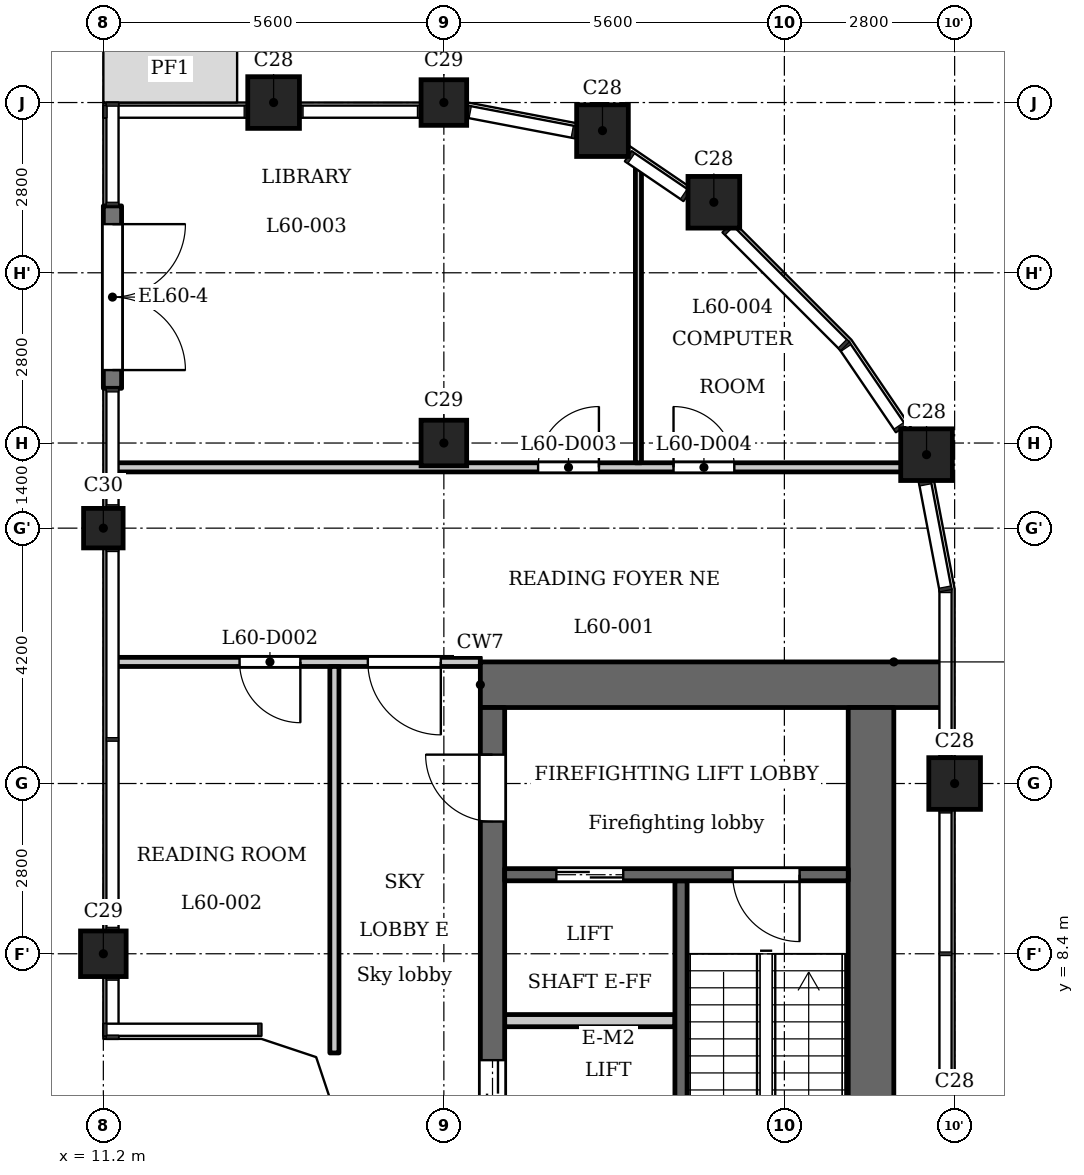
"""IFC4 building model, lengths in metres.
Left out: names, types, materials, properties, quantities, classifications, styles, units other than length and angle.
Written with IfcOpenShell. Run it as: python <this file> out.ifc"""

import sys

from ifc_helpers import new_model, si_unit, direction, frame, frame_2d, origin, origin_2d, place, context, subcontext, project, spatial, polyline, rectangle, outline, extrude, element, fill, save


model = new_model("IFC4")
c1 = context("Model", 3, precision=1e-05, world=origin(), true_north=direction((0.0, 1.0)))
c2 = subcontext(c1, "Body", "Model", "MODEL_VIEW")
j1 = project(units=[si_unit("LENGTHUNIT", "METRE"), si_unit("PLANEANGLEUNIT", "RADIAN")], contexts=[c1])
p1 = place(None, origin())
s1 = spatial("IfcSite", under=j1, at=p1, CompositionType="ELEMENT")
p2 = place(p1, origin())
s2 = spatial("IfcBuilding", under=s1, at=p2, CompositionType="ELEMENT")
p3 = place(p2, frame((0.0, 0.0, 230.9)))
s3 = spatial("IfcBuildingStorey", under=s2, at=p3, CompositionType="ELEMENT", Elevation=230.9)
for number, where, z_axis, x_axis in (
    (1, (25.2, 11.2, 0.0), (0.0, 0.0, 1.0), (1.0, 0.0, 0.0)),
    (2, (24.738, 16.609, 0.0), (0.0, 0.0, 1.0), (1.0, 0.0, 0.0)),
    (3, (21.24, 20.76, 0.0), (0.0, 0.0, 1.0), (1.0, 0.0, 0.0)),
    (4, (19.409, 21.938, 0.0), (0.0, 0.0, 1.0), (1.0, 0.0, 0.0)),
    (5, (14.0, 22.4, 0.0), (0.0, 0.0, 1.0), (1.0, 0.0, 0.0)),
):
    element("IfcColumn", number, at=place(p3, frame(where, z_axis=z_axis, x_axis=x_axis)), inside=s3, PredefinedType="COLUMN", context=c2, shape_type="SweptSolid", body=[
        extrude(rectangle(XDim=0.85, YDim=0.85, at=origin_2d()), origin(), (0.0, 0.0, 1.0), 5.4),
    ])
for number, where, z_axis, x_axis in (
    (6, (16.8, 16.8, 0.0), (0.0, 0.0, 1.0), (1.0, 0.0, 0.0)),
    (7, (16.8, 22.4, 0.0), (0.0, 0.0, 1.0), (1.0, 0.0, 0.0)),
    (8, (11.2, 8.4, 0.0), (0.0, 0.0, 1.0), (1.0, 0.0, 0.0)),
):
    element("IfcColumn", number, at=place(p3, frame(where, z_axis=z_axis, x_axis=x_axis)), inside=s3, PredefinedType="COLUMN", context=c2, shape_type="SweptSolid", body=[
        extrude(rectangle(XDim=0.75, YDim=0.75, at=origin_2d()), origin(), (0.0, 0.0, 1.0), 5.4),
    ])
p4 = place(p3, frame((11.2, 15.4, 0.0), z_axis=(0.0, 0.0, 1.0), x_axis=(1.0, 0.0, 0.0)))
e9 = element("IfcColumn", 9, at=p4, inside=s3, PredefinedType="COLUMN", context=c2, shape_type="SweptSolid", body=[
    extrude(rectangle(XDim=0.65, YDim=0.65, at=origin_2d()), origin(), (0.0, 0.0, 1.0), 5.4),
])
p5 = place(p3, frame((11.35, 20.7, 0.0), z_axis=(0.0, 0.0, 1.0), x_axis=(0.0, -1.0, 0.0)))
e10 = element("IfcWall", 10, at=p5, inside=s3, PredefinedType="SOLIDWALL", context=c2, shape_type="SweptSolid", body=[
    extrude(rectangle(XDim=3.0, YDim=0.3, at=frame_2d((1.5, 0.0))), origin(), (0.0, 0.0, 1.0), 4.95),
])
p6 = place(p5, frame((0.3, 0.0, 0.0)))
e11 = element("IfcOpeningElement", 11, at=p6, cuts=e10, PredefinedType="OPENING", context=c2, shape_type="SweptSolid", body=[
    extrude(rectangle(XDim=2.4, YDim=2.3, at=frame_2d((1.2, 1.15))), frame((0.0, 0.16, 0.0), z_axis=(0.0, -1.0, 0.0), x_axis=(1.0, 0.0, 0.0)), (0.0, 0.0, 1.0), 0.32),
])
p7 = place(p3, frame((20.7, 2.6, 0.0), z_axis=(0.0, 0.0, 1.0), x_axis=(0.0, 1.0, 0.0)))
e12 = element("IfcWall", 12, at=p7, inside=s3, PredefinedType="SHEAR", context=c2, shape_type="SweptSolid", body=[
    extrude(rectangle(XDim=7.0, YDim=0.2, at=frame_2d((3.5, 0.0))), origin(), (0.0, 0.0, 1.0), 4.95),
])
p8 = place(p3, frame((17.4, 12.825, 0.0), z_axis=(0.0, 0.0, 1.0), x_axis=(1.0, 0.0, 0.0)))
e13 = element("IfcWall", 13, at=p8, inside=s3, PredefinedType="SHEAR", context=c2, shape_type="SweptSolid", body=[
    extrude(rectangle(XDim=7.6, YDim=0.75, at=frame_2d((3.8, 0.0))), origin(), (0.0, 0.0, 1.0), 4.95),
])
p9 = place(p3, frame((17.6, -12.45, 0.0), z_axis=(0.0, 0.0, 1.0), x_axis=(0.0, 1.0, 0.0)))
e14 = element("IfcWall", 14, at=p9, inside=s3, PredefinedType="SHEAR", context=c2, shape_type="SweptSolid", body=[
    extrude(rectangle(XDim=24.9, YDim=0.4, at=frame_2d((12.45, 0.0))), origin(), (0.0, 0.0, 1.0), 4.95),
])
p10 = place(p9, frame((8.65, 0.0, 0.0)))
e15 = element("IfcOpeningElement", 15, at=p10, cuts=e14, PredefinedType="OPENING", context=c2, shape_type="SweptSolid", body=[
    extrude(rectangle(XDim=0.9, YDim=2.1, at=frame_2d((0.45, 1.05))), frame((0.0, 0.21, 0.0), z_axis=(0.0, -1.0, 0.0), x_axis=(1.0, 0.0, 0.0)), (0.0, 0.0, 1.0), 0.42),
])
p11 = place(p9, frame((15.6, 0.0, 0.0)))
e16 = element("IfcOpeningElement", 16, at=p11, cuts=e14, PredefinedType="OPENING", context=c2, shape_type="SweptSolid", body=[
    extrude(rectangle(XDim=1.1, YDim=2.1, at=frame_2d((0.55, 1.05))), frame((0.0, 0.21, 0.0), z_axis=(0.0, -1.0, 0.0), x_axis=(1.0, 0.0, 0.0)), (0.0, 0.0, 1.0), 0.42),
])
p12 = place(p9, frame((18.0, 0.0, 0.0)))
e17 = element("IfcOpeningElement", 17, at=p12, cuts=e14, PredefinedType="OPENING", context=c2, shape_type="SweptSolid", body=[
    extrude(rectangle(XDim=1.1, YDim=2.1, at=frame_2d((0.55, 1.05))), frame((0.0, 0.21, 0.0), z_axis=(0.0, -1.0, 0.0), x_axis=(1.0, 0.0, 0.0)), (0.0, 0.0, 1.0), 0.42),
])
p13 = place(p9, frame((23.025, 0.0, 0.0)))
e18 = element("IfcOpeningElement", 18, at=p13, cuts=e14, PredefinedType="OPENING", context=c2, shape_type="SweptSolid", body=[
    extrude(rectangle(XDim=1.1, YDim=2.1, at=frame_2d((0.55, 1.05))), frame((0.0, 0.21, 0.0), z_axis=(0.0, -1.0, 0.0), x_axis=(1.0, 0.0, 0.0)), (0.0, 0.0, 1.0), 0.42),
])
p14 = place(p9, frame((0.775, 0.0, 0.0)))
e19 = element("IfcOpeningElement", 19, at=p14, cuts=e14, PredefinedType="OPENING", context=c2, shape_type="SweptSolid", body=[
    extrude(rectangle(XDim=1.1, YDim=2.1, at=frame_2d((0.55, 1.05))), frame((0.0, 0.21, 0.0), z_axis=(0.0, -1.0, 0.0), x_axis=(1.0, 0.0, 0.0)), (0.0, 0.0, 1.0), 0.42),
])
p15 = place(p9, frame((12.925, 0.0, 0.0)))
e20 = element("IfcOpeningElement", 20, at=p15, cuts=e14, PredefinedType="OPENING", context=c2, shape_type="SweptSolid", body=[
    extrude(rectangle(XDim=1.8, YDim=2.1, at=frame_2d((0.9, 1.05))), frame((0.0, 0.21, 0.0), z_axis=(0.0, -1.0, 0.0), x_axis=(1.0, 0.0, 0.0)), (0.0, 0.0, 1.0), 0.42),
])
p16 = place(p3, frame((23.825, -12.45, 0.0), z_axis=(0.0, 0.0, 1.0), x_axis=(0.0, 1.0, 0.0)))
e21 = element("IfcWall", 21, at=p16, inside=s3, PredefinedType="SHEAR", context=c2, shape_type="SweptSolid", body=[
    extrude(rectangle(XDim=24.9, YDim=0.75, at=frame_2d((12.45, 0.0))), origin(), (0.0, 0.0, 1.0), 4.95),
])
p17 = place(p3, frame((17.8, 7.3, 0.0), z_axis=(0.0, 0.0, 1.0), x_axis=(1.0, 0.0, 0.0)))
e22 = element("IfcWall", 22, at=p17, inside=s3, PredefinedType="PARTITIONING", context=c2, shape_type="SweptSolid", body=[
    extrude(rectangle(XDim=2.8, YDim=0.2, at=frame_2d((1.4, 0.0))), origin(), (0.0, 0.0, 1.0), 4.95),
])
p18 = place(p3, frame((17.8, 9.7, 0.0), z_axis=(0.0, 0.0, 1.0), x_axis=(1.0, 0.0, 0.0)))
e23 = element("IfcWall", 23, at=p18, inside=s3, PredefinedType="SHEAR", context=c2, shape_type="SweptSolid", body=[
    extrude(rectangle(XDim=5.65, YDim=0.2, at=frame_2d((2.825, 0.0))), origin(), (0.0, 0.0, 1.0), 4.95),
])
p19 = place(p18, frame((0.85, 0.0, 0.0)))
e24 = element("IfcOpeningElement", 24, at=p19, cuts=e23, PredefinedType="OPENING", context=c2, shape_type="SweptSolid", body=[
    extrude(rectangle(XDim=1.1, YDim=2.1, at=frame_2d((0.55, 1.05))), frame((0.0, 0.11, 0.0), z_axis=(0.0, -1.0, 0.0), x_axis=(1.0, 0.0, 0.0)), (0.0, 0.0, 1.0), 0.22),
])
p20 = place(p18, frame((3.75, 0.0, 0.0)))
e25 = element("IfcOpeningElement", 25, at=p20, cuts=e23, PredefinedType="OPENING", context=c2, shape_type="SweptSolid", body=[
    extrude(rectangle(XDim=1.1, YDim=2.1, at=frame_2d((0.55, 1.05))), frame((0.0, 0.11, 0.0), z_axis=(0.0, -1.0, 0.0), x_axis=(1.0, 0.0, 0.0)), (0.0, 0.0, 1.0), 0.22),
])
p21 = place(p3, frame((11.384, 13.2, 0.0), z_axis=(0.0, 0.0, 1.0), x_axis=(1.0, 0.0, 0.0)))
e26 = element("IfcWall", 26, at=p21, inside=s3, PredefinedType="PARTITIONING", context=c2, shape_type="SweptSolid", body=[
    extrude(rectangle(XDim=6.016, YDim=0.15, at=frame_2d((3.008, 0.0))), origin(), (0.0, 0.0, 1.0), 4.95),
])
p22 = place(p21, frame((4.166, 0.0, 0.0)))
e27 = element("IfcOpeningElement", 27, at=p22, cuts=e26, PredefinedType="OPENING", context=c2, shape_type="SweptSolid", body=[
    extrude(rectangle(XDim=1.2, YDim=2.1, at=frame_2d((0.6, 1.05))), frame((0.0, 0.085, 0.0), z_axis=(0.0, -1.0, 0.0), x_axis=(1.0, 0.0, 0.0)), (0.0, 0.0, 1.0), 0.17),
])
p23 = place(p21, frame((2.056, 0.0, 0.0)))
e28 = element("IfcOpeningElement", 28, at=p23, cuts=e26, PredefinedType="OPENING", context=c2, shape_type="SweptSolid", body=[
    extrude(rectangle(XDim=1.0, YDim=2.1, at=frame_2d((0.5, 1.05))), frame((0.0, 0.085, 0.0), z_axis=(0.0, -1.0, 0.0), x_axis=(1.0, 0.0, 0.0)), (0.0, 0.0, 1.0), 0.17),
])
p24 = place(p3, frame((11.384, 16.4, 0.0), z_axis=(0.0, 0.0, 1.0), x_axis=(1.0, 0.0, 0.0)))
e29 = element("IfcWall", 29, at=p24, inside=s3, PredefinedType="PARTITIONING", context=c2, shape_type="SweptSolid", body=[
    extrude(rectangle(XDim=13.336, YDim=0.15, at=frame_2d((6.668, 0.0))), origin(), (0.0, 0.0, 1.0), 4.95),
])
p25 = place(p24, frame((6.966, 0.0, 0.0)))
e30 = element("IfcOpeningElement", 30, at=p25, cuts=e29, PredefinedType="OPENING", context=c2, shape_type="SweptSolid", body=[
    extrude(rectangle(XDim=1.0, YDim=2.1, at=frame_2d((0.5, 1.05))), frame((0.0, 0.085, 0.0), z_axis=(0.0, -1.0, 0.0), x_axis=(1.0, 0.0, 0.0)), (0.0, 0.0, 1.0), 0.17),
])
p26 = place(p24, frame((9.193, 0.0, 0.0)))
e31 = element("IfcOpeningElement", 31, at=p26, cuts=e29, PredefinedType="OPENING", context=c2, shape_type="SweptSolid", body=[
    extrude(rectangle(XDim=1.0, YDim=2.1, at=frame_2d((0.5, 1.05))), frame((0.0, 0.085, 0.0), z_axis=(0.0, -1.0, 0.0), x_axis=(1.0, 0.0, 0.0)), (0.0, 0.0, 1.0), 0.17),
])
p27 = place(p3, frame((15.0, 6.769, 0.0), z_axis=(0.0, 0.0, 1.0), x_axis=(0.0, 1.0, 0.0)))
e32 = element("IfcWall", 32, at=p27, inside=s3, PredefinedType="PARTITIONING", context=c2, shape_type="SweptSolid", body=[
    extrude(rectangle(XDim=6.356, YDim=0.15, at=frame_2d((3.178, 0.0))), origin(), (0.0, 0.0, 1.0), 4.95),
])
p28 = place(p3, frame((20.0, 16.475, 0.0), z_axis=(0.0, 0.0, 1.0), x_axis=(0.0, 1.0, 0.0)))
e33 = element("IfcWall", 33, at=p28, inside=s3, PredefinedType="PARTITIONING", context=c2, shape_type="SweptSolid", body=[
    extrude(rectangle(XDim=4.891, YDim=0.1, at=frame_2d((2.446, 0.0))), origin(), (0.0, 0.0, 1.0), 4.95),
])
p29 = place(p3, origin())
e34 = element("IfcWall", 34, at=p29, inside=s3, PredefinedType="SOLIDWALL", context=c2, shape_type="SweptSolid", body=[
    extrude(outline(polyline([(13.8, 7.0), (14.7, 6.7), (15.0, 5.8), (15.3, 5.8), (15.3, 5.849), (14.937, 6.937), (13.849, 7.3), (13.8, 7.3), (13.8, 7.0)])), origin(), (0.0, 0.0, 1.0), 4.95),
])
p30 = place(p6, origin())
e35 = element("IfcDoor", 35, at=p30, inside=s3, OperationType="SINGLE_SWING_LEFT", PredefinedType="DOOR", context=c2, shape_type="SweptSolid", body=[
    extrude(rectangle(XDim=2.4, YDim=2.3, at=frame_2d((1.2, 1.15))), frame((0.0, 0.025, 0.0), z_axis=(0.0, -1.0, 0.0), x_axis=(1.0, 0.0, 0.0)), (0.0, 0.0, 1.0), 0.05),
])
fill(e11, e35)
p31 = place(p12, origin())
e36 = element("IfcDoor", 36, at=p31, inside=s3, OperationType="DOUBLE_DOOR_SLIDING", PredefinedType="DOOR", context=c2, shape_type="SweptSolid", body=[
    extrude(rectangle(XDim=1.1, YDim=2.1, at=frame_2d((0.55, 1.05))), frame((0.0, 0.025, 0.0), z_axis=(0.0, -1.0, 0.0), x_axis=(1.0, 0.0, 0.0)), (0.0, 0.0, 1.0), 0.05),
])
fill(e17, e36)
p32 = place(p19, origin())
e37 = element("IfcDoor", 37, at=p32, inside=s3, OperationType="DOUBLE_DOOR_SLIDING", PredefinedType="DOOR", context=c2, shape_type="SweptSolid", body=[
    extrude(rectangle(XDim=1.1, YDim=2.1, at=frame_2d((0.55, 1.05))), frame((0.0, 0.025, 0.0), z_axis=(0.0, -1.0, 0.0), x_axis=(1.0, 0.0, 0.0)), (0.0, 0.0, 1.0), 0.05),
])
fill(e24, e37)
p33 = place(p13, origin())
e38 = element("IfcDoor", 38, at=p33, inside=s3, OperationType="SINGLE_SWING_LEFT", PredefinedType="DOOR", context=c2, shape_type="SweptSolid", body=[
    extrude(rectangle(XDim=1.1, YDim=2.1, at=frame_2d((0.55, 1.05))), frame((0.0, 0.025, 0.0), z_axis=(0.0, -1.0, 0.0), x_axis=(1.0, 0.0, 0.0)), (0.0, 0.0, 1.0), 0.05),
])
fill(e18, e38)
p34 = place(p20, origin())
e39 = element("IfcDoor", 39, at=p34, inside=s3, OperationType="SINGLE_SWING_RIGHT", PredefinedType="DOOR", context=c2, shape_type="SweptSolid", body=[
    extrude(rectangle(XDim=1.1, YDim=2.1, at=frame_2d((0.55, 1.05))), frame((0.0, 0.025, 0.0), z_axis=(0.0, -1.0, 0.0), x_axis=(1.0, 0.0, 0.0)), (0.0, 0.0, 1.0), 0.05),
])
fill(e25, e39)
p35 = place(p22, origin())
e40 = element("IfcDoor", 40, at=p35, inside=s3, OperationType="SINGLE_SWING_RIGHT", PredefinedType="DOOR", context=c2, shape_type="SweptSolid", body=[
    extrude(rectangle(XDim=1.2, YDim=2.1, at=frame_2d((0.6, 1.05))), frame((0.0, 0.025, 0.0), z_axis=(0.0, -1.0, 0.0), x_axis=(1.0, 0.0, 0.0)), (0.0, 0.0, 1.0), 0.05),
])
fill(e27, e40)
p36 = place(p23, origin())
e41 = element("IfcDoor", 41, at=p36, inside=s3, OperationType="SINGLE_SWING_RIGHT", PredefinedType="DOOR", context=c2, shape_type="SweptSolid", body=[
    extrude(rectangle(XDim=1.0, YDim=2.1, at=frame_2d((0.5, 1.05))), frame((0.0, 0.025, 0.0), z_axis=(0.0, -1.0, 0.0), x_axis=(1.0, 0.0, 0.0)), (0.0, 0.0, 1.0), 0.05),
])
fill(e28, e41)
p37 = place(p25, origin())
e42 = element("IfcDoor", 42, at=p37, inside=s3, OperationType="SINGLE_SWING_LEFT", PredefinedType="DOOR", context=c2, shape_type="SweptSolid", body=[
    extrude(rectangle(XDim=1.0, YDim=2.1, at=frame_2d((0.5, 1.05))), frame((0.0, 0.025, 0.0), z_axis=(0.0, -1.0, 0.0), x_axis=(1.0, 0.0, 0.0)), (0.0, 0.0, 1.0), 0.05),
])
fill(e30, e42)
p38 = place(p26, origin())
e43 = element("IfcDoor", 43, at=p38, inside=s3, OperationType="SINGLE_SWING_RIGHT", PredefinedType="DOOR", context=c2, shape_type="SweptSolid", body=[
    extrude(rectangle(XDim=1.0, YDim=2.1, at=frame_2d((0.5, 1.05))), frame((0.0, 0.025, 0.0), z_axis=(0.0, -1.0, 0.0), x_axis=(1.0, 0.0, 0.0)), (0.0, 0.0, 1.0), 0.05),
])
fill(e31, e43)
save(model, sys.argv[1])
